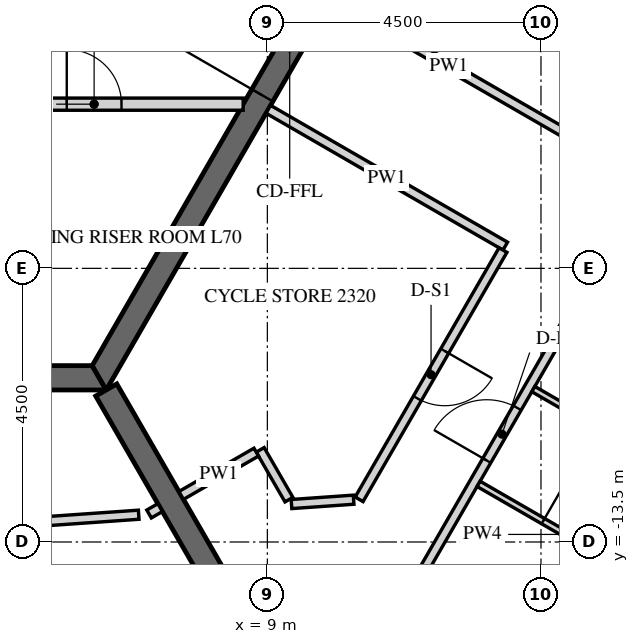
"""IFC4 building model, lengths in metres.
Left out: names, types, materials, properties, quantities, classifications, styles, units other than length and angle.
Written with IfcOpenShell. Run it as: python <this file> out.ifc"""

import sys

from ifc_helpers import new_model, si_unit, direction, frame, frame_2d, origin, place, context, subcontext, project, spatial, polyline, rectangle, outline, extrude, element, fill, save


model = new_model("IFC4")
c1 = context("Model", 3, precision=1e-05, world=origin(), true_north=direction((0.0, 1.0)))
c2 = subcontext(c1, "Body", "Model", "MODEL_VIEW")
j1 = project(units=[si_unit("LENGTHUNIT", "METRE"), si_unit("PLANEANGLEUNIT", "RADIAN")], contexts=[c1])
p1 = place(None, origin())
s1 = spatial("IfcSite", under=j1, at=p1, CompositionType="ELEMENT")
p2 = place(p1, origin())
s2 = spatial("IfcBuilding", under=s1, at=p2, CompositionType="ELEMENT")
p3 = place(p2, frame((0.0, 0.0, 291.3)))
s3 = spatial("IfcBuildingStorey", under=s2, at=p3, CompositionType="ELEMENT", Elevation=291.3)
p4 = place(p3, frame((-6.235, -10.8, -0.15), z_axis=(0.0, 0.0, 1.0), x_axis=(1.0, 0.0, 0.0)))
e1 = element("IfcWall", 1, at=p4, inside=s3, PredefinedType="SHEAR", context=c2, shape_type="SweptSolid", body=[
    extrude(outline(polyline([(-0.115, -0.2), (12.586, -0.2), (12.355, 0.2), (0.115, 0.2), (-0.115, -0.2)])), origin(), (0.0, 0.0, 1.0), 3.9),
])
p5 = place(p3, frame((6.235, -10.8, -0.15), z_axis=(0.0, 0.0, 1.0), x_axis=(0.499996419489, 0.866027470984, 0.0)))
e2 = element("IfcWall", 2, at=p5, inside=s3, PredefinedType="SHEAR", context=c2, shape_type="SweptSolid", body=[
    extrude(outline(polyline([(-0.115, -0.2), (12.586, -0.2), (12.355, 0.2), (0.115, 0.2), (-0.115, -0.2)])), origin(), (0.0, 0.0, 1.0), 3.9),
])
p6 = place(p5, frame((5.364, 0.0, 0.15)))
e3 = element("IfcOpeningElement", 3, at=p6, cuts=e2, PredefinedType="OPENING", context=c2, shape_type="SweptSolid", body=[
    extrude(rectangle(XDim=1.8, YDim=2.4, at=frame_2d((0.9, 1.2))), frame((0.0, 0.21, 0.0), z_axis=(0.0, -1.0, 0.0), x_axis=(1.0, 0.0, 0.0)), (0.0, 0.0, 1.0), 0.42),
])
p7 = place(p3, frame((6.351, -11.0, -0.15), z_axis=(0.0, 0.0, 1.0), x_axis=(0.499998894578, -0.866026041999, 0.0)))
e4 = element("IfcWall", 4, at=p7, inside=s3, PredefinedType="SHEAR", context=c2, shape_type="SweptSolid", body=[
    extrude(rectangle(XDim=15.544, YDim=0.4, at=frame_2d((7.772, 0.0))), origin(), (0.0, 0.0, 1.0), 3.9),
])
p8 = place(p7, frame((6.872, 0.0, 0.15)))
e5 = element("IfcOpeningElement", 5, at=p8, cuts=e4, PredefinedType="OPENING", context=c2, shape_type="SweptSolid", body=[
    extrude(rectangle(XDim=1.8, YDim=2.4, at=frame_2d((0.9, 1.2))), frame((0.0, 0.21, 0.0), z_axis=(0.0, -1.0, 0.0), x_axis=(1.0, 0.0, 0.0)), (0.0, 0.0, 1.0), 0.42),
])
p9 = place(p3, frame((3.7, -6.3, 0.0), z_axis=(0.0, 0.0, 1.0), x_axis=(1.0, 0.0, 0.0)))
e6 = element("IfcWall", 6, at=p9, inside=s3, PredefinedType="PARTITIONING", context=c2, shape_type="SweptSolid", body=[
    extrude(rectangle(XDim=4.903, YDim=0.2, at=frame_2d((2.451, 0.0))), origin(), (0.0, 0.0, 1.0), 3.65),
])
p10 = place(p9, frame((2.001, 0.0, 0.0)))
e7 = element("IfcOpeningElement", 7, at=p10, cuts=e6, PredefinedType="OPENING", context=c2, shape_type="SweptSolid", body=[
    extrude(rectangle(XDim=0.9, YDim=2.1, at=frame_2d((0.45, 1.05))), frame((0.0, 0.11, 0.0), z_axis=(0.0, -1.0, 0.0), x_axis=(1.0, 0.0, 0.0)), (0.0, 0.0, 1.0), 0.22),
])
p11 = place(p3, frame((7.237, -12.935, 0.0), z_axis=(0.0, 0.0, 1.0), x_axis=(-0.866088799389, -0.499890179513, 0.0)))
e8 = element("IfcWall", 8, at=p11, inside=s3, PredefinedType="PARTITIONING", context=c2, shape_type="SweptSolid", body=[
    extrude(rectangle(XDim=0.21, YDim=0.15, at=frame_2d((0.105, 0.0))), origin(), (0.0, 0.0, 1.0), 2.988),
])
p12 = place(p3, frame((6.884, -13.052, 0.0), z_axis=(0.0, 0.0, 1.0), x_axis=(-0.997564224443, -0.069753982764, 0.0)))
e9 = element("IfcWall", 9, at=p12, inside=s3, PredefinedType="PARTITIONING", context=c2, shape_type="SweptSolid", body=[
    extrude(rectangle(XDim=16.618, YDim=0.15, at=frame_2d((8.309, 0.0))), origin(), (0.0, 0.0, 1.0), 2.988),
])
p13 = place(p12, frame((7.859, 0.0, 0.0)))
e10 = element("IfcOpeningElement", 10, at=p13, cuts=e9, PredefinedType="OPENING", context=c2, shape_type="SweptSolid", body=[
    extrude(rectangle(XDim=0.9, YDim=2.1, at=frame_2d((0.45, 1.05))), frame((0.0, 0.085, 0.0), z_axis=(0.0, -1.0, 0.0), x_axis=(1.0, 0.0, 0.0)), (0.0, 0.0, 1.0), 0.17),
])
p14 = place(p3, frame((11.447, -14.174, 0.0), z_axis=(0.0, 0.0, 1.0), x_axis=(0.500003306199, 0.866023494941, 0.0)))
e11 = element("IfcWall", 11, at=p14, inside=s3, PredefinedType="PARTITIONING", context=c2, shape_type="SweptSolid", body=[
    extrude(rectangle(XDim=14.949, YDim=0.15, at=frame_2d((7.475, 0.0))), origin(), (0.0, 0.0, 1.0), 2.988),
])
p15 = place(p14, frame((2.325, 0.0, 0.0)))
e12 = element("IfcOpeningElement", 12, at=p15, cuts=e11, PredefinedType="OPENING", context=c2, shape_type="SweptSolid", body=[
    extrude(rectangle(XDim=1.0, YDim=2.1, at=frame_2d((0.5, 1.05))), frame((0.0, 0.085, 0.0), z_axis=(0.0, -1.0, 0.0), x_axis=(1.0, 0.0, 0.0)), (0.0, 0.0, 1.0), 0.17),
])
p16 = place(p14, frame((12.177, 0.0, 0.0)))
e13 = element("IfcOpeningElement", 13, at=p16, cuts=e11, PredefinedType="OPENING", context=c2, shape_type="SweptSolid", body=[
    extrude(rectangle(XDim=1.0, YDim=2.1, at=frame_2d((0.5, 1.05))), frame((0.0, 0.085, 0.0), z_axis=(0.0, -1.0, 0.0), x_axis=(1.0, 0.0, 0.0)), (0.0, 0.0, 1.0), 0.17),
])
p17 = place(p3, frame((13.898, -6.778, 0.0), z_axis=(0.0, 0.0, 1.0), x_axis=(-0.866041342403, 0.499972392486, 0.0)))
e14 = element("IfcWall", 14, at=p17, inside=s3, PredefinedType="PARTITIONING", context=c2, shape_type="SweptSolid", body=[
    extrude(rectangle(XDim=4.425, YDim=0.15, at=frame_2d((2.212, 0.0))), origin(), (0.0, 0.0, 1.0), 2.988),
])
p18 = place(p3, frame((9.016, -6.384, 0.0), z_axis=(0.0, 0.0, 1.0), x_axis=(0.866031096941, -0.499990139034, 0.0)))
e15 = element("IfcWall", 15, at=p18, inside=s3, PredefinedType="PARTITIONING", context=c2, shape_type="SweptSolid", body=[
    extrude(rectangle(XDim=4.5, YDim=0.15, at=frame_2d((2.25, 0.0))), origin(), (0.0, 0.0, 1.0), 2.988),
])
p19 = place(p3, frame((12.875, -8.699, 0.0), z_axis=(0.0, 0.0, 1.0), x_axis=(-0.49999482868, -0.866028389427, 0.0)))
e16 = element("IfcWall", 16, at=p19, inside=s3, PredefinedType="PARTITIONING", context=c2, shape_type="SweptSolid", body=[
    extrude(rectangle(XDim=4.733, YDim=0.15, at=frame_2d((2.366, 0.0))), origin(), (0.0, 0.0, 1.0), 2.988),
])
p20 = place(p19, frame((1.917, 0.0, 0.0)))
e17 = element("IfcOpeningElement", 17, at=p20, cuts=e16, PredefinedType="OPENING", context=c2, shape_type="SweptSolid", body=[
    extrude(rectangle(XDim=0.9, YDim=2.1, at=frame_2d((0.45, 1.05))), frame((0.0, 0.085, 0.0), z_axis=(0.0, -1.0, 0.0), x_axis=(1.0, 0.0, 0.0)), (0.0, 0.0, 1.0), 0.17),
])
p21 = place(p3, frame((10.419, -12.804, 0.0), z_axis=(0.0, 0.0, 1.0), x_axis=(-0.997558136861, -0.069840987838, 0.0)))
e18 = element("IfcWall", 18, at=p21, inside=s3, PredefinedType="PARTITIONING", context=c2, shape_type="SweptSolid", body=[
    extrude(rectangle(XDim=1.024, YDim=0.15, at=frame_2d((0.512, 0.0))), origin(), (0.0, 0.0, 1.0), 2.988),
])
p22 = place(p3, frame((9.355, -12.804, 0.0), z_axis=(0.0, 0.0, 1.0), x_axis=(-0.499998034377, 0.866026538634, 0.0)))
e19 = element("IfcWall", 19, at=p22, inside=s3, PredefinedType="PARTITIONING", context=c2, shape_type="SweptSolid", body=[
    extrude(rectangle(XDim=0.946, YDim=0.15, at=frame_2d((0.473, 0.0))), origin(), (0.0, 0.0, 1.0), 2.988),
])
p23 = place(p3, frame((8.817, -12.022, 0.0), z_axis=(0.0, 0.0, 1.0), x_axis=(-0.866062911188, -0.499935029643, 0.0)))
e20 = element("IfcWall", 20, at=p23, inside=s3, PredefinedType="PARTITIONING", context=c2, shape_type="SweptSolid", body=[
    extrude(rectangle(XDim=1.425, YDim=0.15, at=frame_2d((0.712, 0.0))), origin(), (0.0, 0.0, 1.0), 2.988),
])
p24 = place(p3, frame((13.374, -10.985, 0.0), z_axis=(0.0, 0.0, 1.0), x_axis=(0.866020521143, -0.500008456887, 0.0)))
e21 = element("IfcWall", 21, at=p24, inside=s3, PredefinedType="PARTITIONING", context=c2, shape_type="SweptSolid", body=[
    extrude(rectangle(XDim=3.325, YDim=0.1, at=frame_2d((1.663, 0.0))), origin(), (0.0, 0.0, 1.0), 2.988),
])
p25 = place(p24, frame((1.175, 0.0, 0.0)))
e22 = element("IfcOpeningElement", 22, at=p25, cuts=e21, PredefinedType="OPENING", context=c2, shape_type="SweptSolid", body=[
    extrude(rectangle(XDim=0.9, YDim=2.1, at=frame_2d((0.45, 1.05))), frame((0.0, 0.06, 0.0), z_axis=(0.0, -1.0, 0.0), x_axis=(1.0, 0.0, 0.0)), (0.0, 0.0, 1.0), 0.12),
])
p26 = place(p3, frame((12.474, -12.544, 0.0), z_axis=(0.0, 0.0, 1.0), x_axis=(0.866002163101, -0.500040251884, 0.0)))
e23 = element("IfcWall", 23, at=p26, inside=s3, PredefinedType="PARTITIONING", context=c2, shape_type="SweptSolid", body=[
    extrude(rectangle(XDim=3.325, YDim=0.1, at=frame_2d((1.663, 0.0))), origin(), (0.0, 0.0, 1.0), 2.988),
])
p27 = place(p26, frame((1.225, 0.0, 0.0)))
e24 = element("IfcOpeningElement", 24, at=p27, cuts=e23, PredefinedType="OPENING", context=c2, shape_type="SweptSolid", body=[
    extrude(rectangle(XDim=0.8, YDim=2.1, at=frame_2d((0.4, 1.05))), frame((0.0, 0.06, 0.0), z_axis=(0.0, -1.0, 0.0), x_axis=(1.0, 0.0, 0.0)), (0.0, 0.0, 1.0), 0.12),
])
p28 = place(p6, origin())
e25 = element("IfcDoor", 25, at=p28, inside=s3, OperationType="DOUBLE_DOOR_SINGLE_SWING", PredefinedType="DOOR", context=c2, shape_type="SweptSolid", body=[
    extrude(rectangle(XDim=1.8, YDim=2.4, at=frame_2d((0.9, 1.2))), frame((0.0, 0.025, 0.0), z_axis=(0.0, -1.0, 0.0), x_axis=(1.0, 0.0, 0.0)), (0.0, 0.0, 1.0), 0.05),
])
fill(e3, e25)
p29 = place(p10, origin())
e26 = element("IfcDoor", 26, at=p29, inside=s3, OperationType="SINGLE_SWING_LEFT", PredefinedType="DOOR", context=c2, shape_type="SweptSolid", body=[
    extrude(rectangle(XDim=0.9, YDim=2.1, at=frame_2d((0.45, 1.05))), frame((0.0, 0.025, 0.0), z_axis=(0.0, -1.0, 0.0), x_axis=(1.0, 0.0, 0.0)), (0.0, 0.0, 1.0), 0.05),
])
fill(e7, e26)
p30 = place(p15, origin())
e27 = element("IfcDoor", 27, at=p30, inside=s3, OperationType="SINGLE_SWING_LEFT", PredefinedType="DOOR", context=c2, shape_type="SweptSolid", body=[
    extrude(rectangle(XDim=1.0, YDim=2.1, at=frame_2d((0.5, 1.05))), frame((0.0, 0.025, 0.0), z_axis=(0.0, -1.0, 0.0), x_axis=(1.0, 0.0, 0.0)), (0.0, 0.0, 1.0), 0.05),
])
fill(e12, e27)
p31 = place(p27, origin())
e28 = element("IfcDoor", 28, at=p31, inside=s3, OperationType="SINGLE_SWING_RIGHT", PredefinedType="DOOR", context=c2, shape_type="SweptSolid", body=[
    extrude(rectangle(XDim=0.8, YDim=2.1, at=frame_2d((0.4, 1.05))), frame((0.0, 0.025, 0.0), z_axis=(0.0, -1.0, 0.0), x_axis=(1.0, 0.0, 0.0)), (0.0, 0.0, 1.0), 0.05),
])
fill(e24, e28)
p32 = place(p20, origin())
e29 = element("IfcDoor", 29, at=p32, inside=s3, OperationType="SINGLE_SWING_LEFT", PredefinedType="DOOR", context=c2, shape_type="SweptSolid", body=[
    extrude(rectangle(XDim=0.9, YDim=2.1, at=frame_2d((0.45, 1.05))), frame((0.0, 0.025, 0.0), z_axis=(0.0, -1.0, 0.0), x_axis=(1.0, 0.0, 0.0)), (0.0, 0.0, 1.0), 0.05),
])
fill(e17, e29)
save(model, sys.argv[1])
